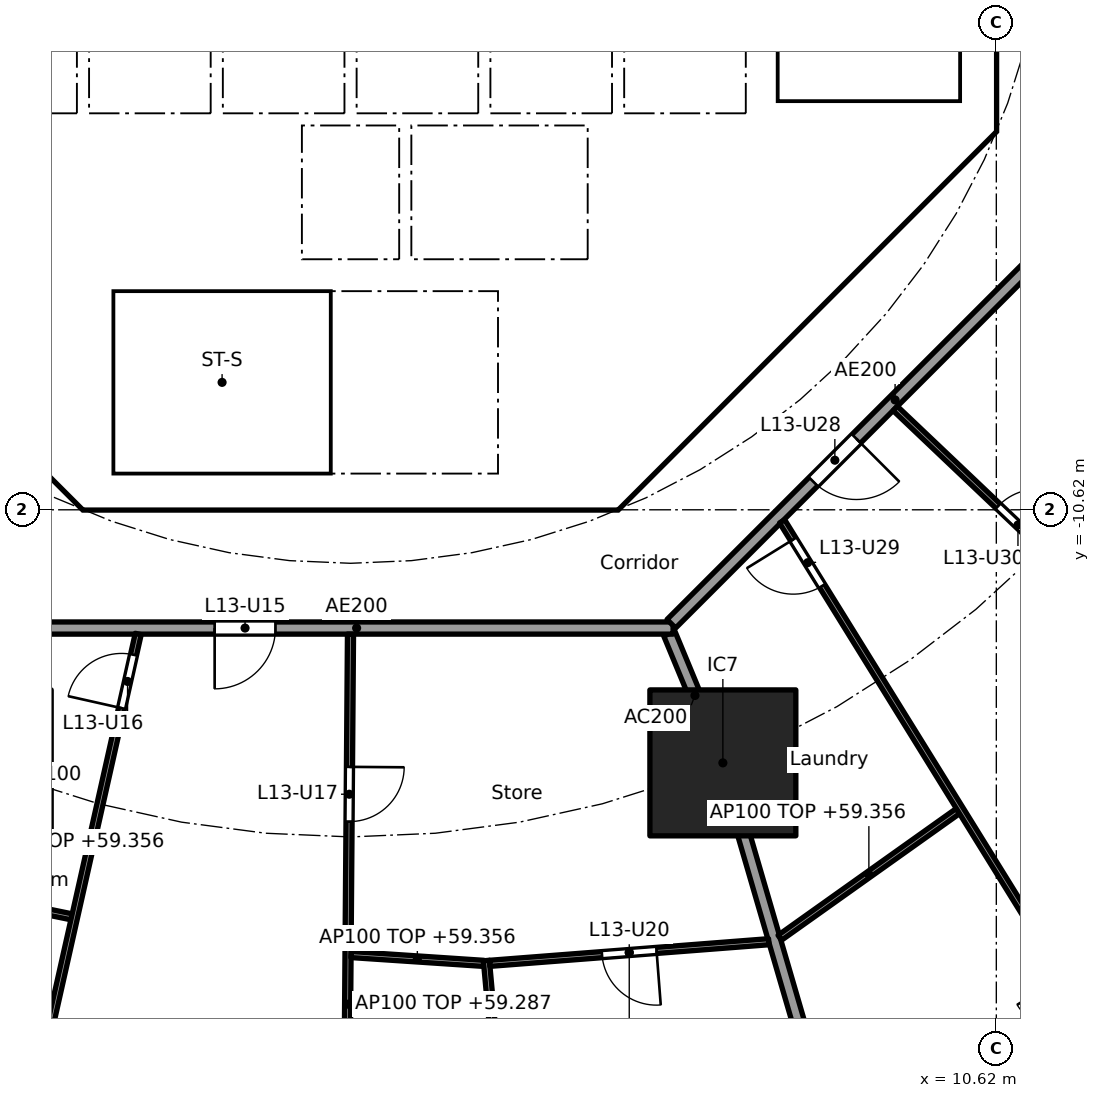
"""IFC4 building model, lengths in metres.
Left out: names, types, materials, properties, quantities, classifications, styles, units other than length and angle.
Written with IfcOpenShell. Run it as: python <this file> out.ifc"""

import sys

from ifc_helpers import new_model, si_unit, direction, frame, frame_2d, origin, origin_2d, place, context, subcontext, project, spatial, polyline, rectangle, outline, extrude, element, fill, save


model = new_model("IFC4")
c1 = context("Model", 3, precision=1e-05, world=origin(), true_north=direction((0.0, 1.0)))
c2 = subcontext(c1, "Body", "Model", "MODEL_VIEW")
j1 = project(units=[si_unit("LENGTHUNIT", "METRE"), si_unit("PLANEANGLEUNIT", "RADIAN")], contexts=[c1])
p1 = place(None, origin())
s1 = spatial("IfcSite", under=j1, at=p1, CompositionType="ELEMENT")
p2 = place(p1, origin())
s2 = spatial("IfcBuilding", under=s1, at=p2, CompositionType="ELEMENT")
p3 = place(p2, frame((0.0, 0.0, 56.6)))
s3 = spatial("IfcBuildingStorey", under=s2, at=p3, CompositionType="ELEMENT", Elevation=56.6)
p4 = place(p3, frame((6.123, -14.782, 0.0), z_axis=(0.0, 0.0, 1.0), x_axis=(1.0, 0.0, 0.0)))
e1 = element("IfcColumn", 1, at=p4, inside=s3, PredefinedType="COLUMN", context=c2, shape_type="SweptSolid", body=[
    extrude(rectangle(XDim=2.4, YDim=2.4, at=origin_2d()), origin(), (0.0, 0.0, 1.0), 3.7),
])
p5 = place(p3, frame((-9.988, -4.613, 0.0), z_axis=(0.0, 0.0, 1.0), x_axis=(0.707106781187, -0.707106781187, 0.0)))
e2 = element("IfcWall", 2, at=p5, inside=s3, PredefinedType="SHEAR", context=c2, shape_type="SweptSolid", body=[
    extrude(rectangle(XDim=7.602, YDim=0.6, at=frame_2d((3.801, 0.0))), origin(), (0.0, 0.0, 1.0), 3.44),
])
p6 = place(p5, frame((6.151, 0.0, 0.0)))
e3 = element("IfcOpeningElement", 3, at=p6, cuts=e2, PredefinedType="OPENING", context=c2, shape_type="SweptSolid", body=[
    extrude(rectangle(XDim=1.1, YDim=2.1, at=frame_2d((0.55, 1.05))), frame((0.0, 0.31, 0.0), z_axis=(0.0, -1.0, 0.0), x_axis=(1.0, 0.0, 0.0)), (0.0, 0.0, 1.0), 0.62),
])
p7 = place(p3, frame((4.613, -9.988, 0.0), z_axis=(0.0, 0.0, 1.0), x_axis=(0.707106781187, 0.707106781187, 0.0)))
e4 = element("IfcWall", 4, at=p7, inside=s3, PredefinedType="SHEAR", context=c2, shape_type="SweptSolid", body=[
    extrude(rectangle(XDim=7.602, YDim=0.6, at=frame_2d((3.801, 0.0))), origin(), (0.0, 0.0, 1.0), 3.44),
])
p8 = place(p7, frame((3.201, 0.0, 0.0)))
e5 = element("IfcOpeningElement", 5, at=p8, cuts=e4, PredefinedType="OPENING", context=c2, shape_type="SweptSolid", body=[
    extrude(rectangle(XDim=1.2, YDim=2.1, at=frame_2d((0.6, 1.05))), frame((0.0, 0.31, 0.0), z_axis=(0.0, -1.0, 0.0), x_axis=(1.0, 0.0, 0.0)), (0.0, 0.0, 1.0), 0.62),
])
p9 = place(p3, frame((4.0, -10.025, 0.0), z_axis=(0.0, 0.0, 1.0), x_axis=(0.0, 1.0, 0.0)))
e6 = element("IfcWall", 6, at=p9, inside=s3, PredefinedType="SOLIDWALL", context=c2, shape_type="SweptSolid", body=[
    extrude(rectangle(XDim=3.0, YDim=0.2, at=frame_2d((1.5, 0.0))), origin(), (0.0, 0.0, 1.0), 3.44),
])
p10 = place(p9, frame((0.975, 0.0, 0.0)))
e7 = element("IfcOpeningElement", 7, at=p10, cuts=e6, PredefinedType="OPENING", context=c2, shape_type="SweptSolid", body=[
    extrude(rectangle(XDim=1.1, YDim=2.1, at=frame_2d((0.55, 1.05))), frame((0.0, 0.11, 0.0), z_axis=(0.0, -1.0, 0.0), x_axis=(1.0, 0.0, 0.0)), (0.0, 0.0, 1.0), 0.22),
])
p11 = place(p3, frame((4.0, -6.5, 0.0), z_axis=(0.0, 0.0, 1.0), x_axis=(0.0, 1.0, 0.0)))
e8 = element("IfcWall", 8, at=p11, inside=s3, PredefinedType="SOLIDWALL", context=c2, shape_type="SweptSolid", body=[
    extrude(rectangle(XDim=2.2, YDim=0.2, at=frame_2d((1.1, 0.0))), origin(), (0.0, 0.0, 1.0), 3.44),
])
p12 = place(p11, frame((0.55, 0.0, 0.0)))
e9 = element("IfcOpeningElement", 9, at=p12, cuts=e8, PredefinedType="OPENING", context=c2, shape_type="SweptSolid", body=[
    extrude(rectangle(XDim=1.1, YDim=2.1, at=frame_2d((0.55, 1.05))), frame((0.0, 0.11, 0.0), z_axis=(0.0, -1.0, 0.0), x_axis=(1.0, 0.0, 0.0)), (0.0, 0.0, 1.0), 0.22),
])
p13 = place(p3, frame((-4.0, -6.5, 0.0), z_axis=(0.0, 0.0, 1.0), x_axis=(0.0, 1.0, 0.0)))
e10 = element("IfcWall", 10, at=p13, inside=s3, PredefinedType="SOLIDWALL", context=c2, shape_type="SweptSolid", body=[
    extrude(rectangle(XDim=2.2, YDim=0.2, at=frame_2d((1.1, 0.0))), origin(), (0.0, 0.0, 1.0), 3.44),
])
p14 = place(p13, frame((0.65, 0.0, 0.0)))
e11 = element("IfcOpeningElement", 11, at=p14, cuts=e10, PredefinedType="OPENING", context=c2, shape_type="SweptSolid", body=[
    extrude(rectangle(XDim=0.9, YDim=2.1, at=frame_2d((0.45, 1.05))), frame((0.0, 0.11, 0.0), z_axis=(0.0, -1.0, 0.0), x_axis=(1.0, 0.0, 0.0)), (0.0, 0.0, 1.0), 0.22),
])
p15 = place(p3, origin())
e12 = element("IfcWall", 12, at=p15, inside=s3, PredefinedType="SHEAR", context=c2, shape_type="SweptSolid", body=[
    extrude(outline(polyline([(-4.152, -10.025), (4.152, -10.025), (4.401, -9.776), (4.825, -10.2), (4.401, -10.625), (-4.401, -10.625), (-4.825, -10.2), (-4.401, -9.776), (-4.152, -10.025)])), origin(), (0.0, 0.0, 1.0), 3.44),
])
p16 = place(p3, origin())
e13 = element("IfcWall", 13, at=p16, inside=s3, PredefinedType="SHEAR", context=c2, shape_type="SweptSolid", body=[
    extrude(outline(polyline([(9.776, -4.401), (10.025, -4.152), (10.025, -3.801), (10.025, 4.152), (9.776, 4.401), (10.2, 4.825), (10.625, 4.401), (10.625, -4.401), (10.2, -4.825), (9.776, -4.401)])), origin(), (0.0, 0.0, 1.0), 3.44),
])
for number, where, z_axis, x_axis in (
    (14, (-0.9, -6.5, 0.0), (0.0, 0.0, 1.0), (0.0, 1.0, 0.0)),
    (15, (0.9, -6.5, 0.0), (0.0, 0.0, 1.0), (0.0, 1.0, 0.0)),
):
    element("IfcWall", number, at=place(p3, frame(where, z_axis=z_axis, x_axis=x_axis)), inside=s3, PredefinedType="SOLIDWALL", context=c2, shape_type="SweptSolid", body=[
        extrude(rectangle(XDim=2.2, YDim=0.2, at=frame_2d((1.1, 0.0))), origin(), (0.0, 0.0, 1.0), 3.44),
    ])
p17 = place(p3, origin())
e16 = element("IfcWall", 16, at=p17, inside=s3, PredefinedType="SOLIDWALL", context=c2, shape_type="SweptSolid", body=[
    extrude(outline(polyline([(-6.7, -2.1), (-6.5, -2.1), (-6.5, -4.1), (-4.5, -4.1), (-4.5, -2.1), (-4.3, -2.1), (-4.3, -4.1), (-2.3, -4.1), (-2.3, -2.1), (-2.1, -2.1), (-2.1, -4.1), (-0.1, -4.1), (-0.1, -2.1), (0.1, -2.1), (0.1, -4.1), (2.1, -4.1), (2.1, -2.1), (2.3, -2.1), (2.3, -4.1), (4.3, -4.1), (4.3, -2.1), (4.5, -2.1), (4.5, -4.1), (6.5, -4.1), (6.5, -2.1), (6.7, -2.1), (6.7, -4.3), (-6.7, -4.3), (-6.7, -2.1)])), origin(), (0.0, 0.0, 1.0), 3.44),
])
p18 = place(p3, origin())
e17 = element("IfcWall", 17, at=p18, inside=s3, PredefinedType="SOLIDWALL", context=c2, shape_type="SweptSolid", body=[
    extrude(outline(polyline([(-3.9, -10.025), (-4.1, -10.025), (-4.1, -7.025), (-3.9, -7.025), (-3.9, -10.025)])), origin(), (0.0, 0.0, 1.0), 3.44),
])
p19 = place(p3, origin())
e18 = element("IfcWall", 18, at=p19, inside=s3, PredefinedType="SOLIDWALL", context=c2, shape_type="SweptSolid", body=[
    extrude(outline(polyline([(4.1, -7.025), (-4.1, -7.025), (-4.1, -6.5), (4.1, -6.5), (4.1, -7.025)])), origin(), (0.0, 0.0, 1.0), 3.44),
])
p20 = place(p3, origin())
e19 = element("IfcWall", 19, at=p20, inside=s3, PredefinedType="SOLIDWALL", context=c2, shape_type="SweptSolid", body=[
    extrude(outline(polyline([(7.025, -3.9), (6.7, -3.9), (6.7, 3.9), (7.025, 3.9), (7.025, -3.9)])), origin(), (0.0, 0.0, 1.0), 3.44),
])
p21 = place(p3, origin())
e20 = element("IfcWall", 20, at=p21, inside=s3, PredefinedType="SOLIDWALL", context=c2, shape_type="SweptSolid", body=[
    extrude(outline(polyline([(10.025, -4.1), (6.7, -4.1), (6.7, -3.9), (10.025, -3.9), (10.025, -4.1)])), origin(), (0.0, 0.0, 1.0), 3.44),
])
p22 = place(p3, frame((5.243, -12.657, 0.0), z_axis=(0.0, 0.0, 1.0), x_axis=(0.382707856524, -0.923869415315, 0.0)))
e21 = element("IfcWall", 21, at=p22, inside=s3, PredefinedType="PARTITIONING", context=c2, shape_type="SweptSolid", body=[
    extrude(rectangle(XDim=2.2, YDim=0.2, at=frame_2d((1.1, 0.0))), origin(), (0.0, 0.0, 1.0), 3.44),
])
p23 = place(p3, frame((6.137, -14.83, 0.0), z_axis=(0.0, 0.0, 1.0), x_axis=(0.27985745069, -0.960041565399, 0.0)))
e22 = element("IfcWall", 22, at=p23, inside=s3, PredefinedType="PARTITIONING", context=c2, shape_type="SweptSolid", body=[
    extrude(rectangle(XDim=16.705, YDim=0.2, at=frame_2d((8.353, 0.0))), origin(), (0.0, 0.0, 1.0), 2.756),
])
p24 = place(p3, frame((-5.104, -12.565, 0.0), z_axis=(0.0, 0.0, 1.0), x_axis=(1.0, 0.0, 0.0)))
e23 = element("IfcWall", 23, at=p24, inside=s3, PredefinedType="PARTITIONING", context=c2, shape_type="SweptSolid", body=[
    extrude(rectangle(XDim=10.409, YDim=0.2, at=frame_2d((5.205, 0.0))), origin(), (0.0, 0.0, 1.0), 3.44),
])
p25 = place(p24, frame((2.87, 0.0, 0.0)))
e24 = element("IfcOpeningElement", 24, at=p25, cuts=e23, PredefinedType="OPENING", context=c2, shape_type="SweptSolid", body=[
    extrude(rectangle(XDim=1.0, YDim=2.1, at=frame_2d((0.5, 1.05))), frame((0.0, 0.11, 0.0), z_axis=(0.0, -1.0, 0.0), x_axis=(1.0, 0.0, 0.0)), (0.0, 0.0, 1.0), 0.22),
])
p26 = place(p3, frame((5.275, -12.494, 0.0), z_axis=(0.0, 0.0, 1.0), x_axis=(0.707106781187, 0.707106781187, 0.0)))
e25 = element("IfcWall", 25, at=p26, inside=s3, PredefinedType="PARTITIONING", context=c2, shape_type="SweptSolid", body=[
    extrude(rectangle(XDim=10.409, YDim=0.2, at=frame_2d((5.205, 0.0))), origin(), (0.0, 0.0, 1.0), 3.44),
])
p27 = place(p26, frame((3.303, 0.0, 0.0)))
e26 = element("IfcOpeningElement", 26, at=p27, cuts=e25, PredefinedType="OPENING", context=c2, shape_type="SweptSolid", body=[
    extrude(rectangle(XDim=1.0, YDim=2.1, at=frame_2d((0.5, 1.05))), frame((0.0, 0.11, 0.0), z_axis=(0.0, -1.0, 0.0), x_axis=(1.0, 0.0, 0.0)), (0.0, 0.0, 1.0), 0.22),
])
p28 = place(p3, frame((-6.791, -16.862, 0.0), z_axis=(0.0, 0.0, 1.0), x_axis=(0.979581941859, -0.201045316246, 0.0)))
e27 = element("IfcWall", 27, at=p28, inside=s3, PredefinedType="PARTITIONING", context=c2, shape_type="SweptSolid", body=[
    extrude(rectangle(XDim=2.256, YDim=0.1, at=frame_2d((1.128, 0.0))), origin(), (0.0, 0.0, 1.0), 2.756),
])
p29 = place(p3, frame((-3.492, -12.662, 0.0), z_axis=(0.0, 0.0, 1.0), x_axis=(-0.219268088006, -0.975664648115, 0.0)))
e28 = element("IfcWall", 28, at=p29, inside=s3, PredefinedType="PARTITIONING", context=c2, shape_type="SweptSolid", body=[
    extrude(rectangle(XDim=18.23, YDim=0.1, at=frame_2d((9.115, 0.0))), origin(), (0.0, 0.0, 1.0), 2.687),
])
p30 = place(p29, frame((0.35, 0.0, 0.0)))
e29 = element("IfcOpeningElement", 29, at=p30, cuts=e28, PredefinedType="OPENING", context=c2, shape_type="SweptSolid", body=[
    extrude(rectangle(XDim=0.9, YDim=2.1, at=frame_2d((0.45, 1.05))), frame((0.0, 0.06, 0.0), z_axis=(0.0, -1.0, 0.0), x_axis=(1.0, 0.0, 0.0)), (0.0, 0.0, 1.0), 0.12),
])
p31 = place(p29, frame((7.497, 0.0, 0.0)))
e30 = element("IfcOpeningElement", 30, at=p31, cuts=e28, PredefinedType="OPENING", context=c2, shape_type="SweptSolid", body=[
    extrude(rectangle(XDim=0.9, YDim=2.1, at=frame_2d((0.45, 1.05))), frame((0.0, 0.06, 0.0), z_axis=(0.0, -1.0, 0.0), x_axis=(1.0, 0.0, 0.0)), (0.0, 0.0, 1.0), 0.12),
])
p32 = place(p29, frame((14.223, 0.0, 0.0)))
e31 = element("IfcOpeningElement", 31, at=p32, cuts=e28, PredefinedType="OPENING", context=c2, shape_type="SweptSolid", body=[
    extrude(rectangle(XDim=0.9, YDim=2.1, at=frame_2d((0.45, 1.05))), frame((0.0, 0.06, 0.0), z_axis=(0.0, -1.0, 0.0), x_axis=(1.0, 0.0, 0.0)), (0.0, 0.0, 1.0), 0.12),
])
p33 = place(p3, frame((-0.001, -12.665, 0.0), z_axis=(0.0, 0.0, 1.0), x_axis=(-0.007702417287, -0.999970335944, 0.0)))
e32 = element("IfcWall", 32, at=p33, inside=s3, PredefinedType="PARTITIONING", context=c2, shape_type="SweptSolid", body=[
    extrude(rectangle(XDim=12.171, YDim=0.1, at=frame_2d((6.086, 0.0))), origin(), (0.0, 0.0, 1.0), 2.687),
])
p34 = place(p33, frame((2.183, 0.0, 0.0)))
e33 = element("IfcOpeningElement", 33, at=p34, cuts=e32, PredefinedType="OPENING", context=c2, shape_type="SweptSolid", body=[
    extrude(rectangle(XDim=0.9, YDim=2.1, at=frame_2d((0.45, 1.05))), frame((0.0, 0.06, 0.0), z_axis=(0.0, -1.0, 0.0), x_axis=(1.0, 0.0, 0.0)), (0.0, 0.0, 1.0), 0.12),
])
p35 = place(p33, frame((8.269, 0.0, 0.0)))
e34 = element("IfcOpeningElement", 34, at=p35, cuts=e32, PredefinedType="OPENING", context=c2, shape_type="SweptSolid", body=[
    extrude(rectangle(XDim=0.9, YDim=2.1, at=frame_2d((0.45, 1.05))), frame((0.0, 0.06, 0.0), z_axis=(0.0, -1.0, 0.0), x_axis=(1.0, 0.0, 0.0)), (0.0, 0.0, 1.0), 0.12),
])
p36 = place(p3, frame((0.009, -17.934, 0.0), z_axis=(0.0, 0.0, 1.0), x_axis=(0.997794542617, -0.066378089183, 0.0)))
e35 = element("IfcWall", 35, at=p36, inside=s3, PredefinedType="PARTITIONING", context=c2, shape_type="SweptSolid", body=[
    extrude(rectangle(XDim=2.185, YDim=0.1, at=frame_2d((1.092, 0.0))), origin(), (0.0, 0.0, 1.0), 2.756),
])
p37 = place(p3, frame((2.234, -18.032, 0.0), z_axis=(0.0, 0.0, 1.0), x_axis=(0.090891502968, -0.995860800859, 0.0)))
e36 = element("IfcWall", 36, at=p37, inside=s3, PredefinedType="PARTITIONING", context=c2, shape_type="SweptSolid", body=[
    extrude(rectangle(XDim=13.984, YDim=0.1, at=frame_2d((6.992, 0.0))), origin(), (0.0, 0.0, 1.0), 2.756),
])
p38 = place(p37, frame((10.158, 0.0, 0.0)))
e37 = element("IfcOpeningElement", 37, at=p38, cuts=e36, PredefinedType="OPENING", context=c2, shape_type="SweptSolid", body=[
    extrude(rectangle(XDim=0.9, YDim=2.1, at=frame_2d((0.45, 1.05))), frame((0.0, 0.06, 0.0), z_axis=(0.0, -1.0, 0.0), x_axis=(1.0, 0.0, 0.0)), (0.0, 0.0, 1.0), 0.12),
])
p39 = place(p3, frame((2.288, -18.078, 0.0), z_axis=(0.0, 0.0, 1.0), x_axis=(0.99701850123, 0.077162868047, 0.0)))
e38 = element("IfcWall", 38, at=p39, inside=s3, PredefinedType="PARTITIONING", context=c2, shape_type="SweptSolid", body=[
    extrude(rectangle(XDim=4.604, YDim=0.1, at=frame_2d((2.302, 0.0))), origin(), (0.0, 0.0, 1.0), 2.756),
])
p40 = place(p39, frame((1.852, 0.0, 0.0)))
e39 = element("IfcOpeningElement", 39, at=p40, cuts=e38, PredefinedType="OPENING", context=c2, shape_type="SweptSolid", body=[
    extrude(rectangle(XDim=0.9, YDim=2.1, at=frame_2d((0.45, 1.05))), frame((0.0, 0.06, 0.0), z_axis=(0.0, -1.0, 0.0), x_axis=(1.0, 0.0, 0.0)), (0.0, 0.0, 1.0), 0.12),
])
p41 = place(p3, frame((7.06, -17.657, 0.0), z_axis=(0.0, 0.0, 1.0), x_axis=(0.81492039338, 0.57957290521, 0.0)))
e40 = element("IfcWall", 40, at=p41, inside=s3, PredefinedType="PARTITIONING", context=c2, shape_type="SweptSolid", body=[
    extrude(rectangle(XDim=3.594, YDim=0.1, at=frame_2d((1.797, 0.0))), origin(), (0.0, 0.0, 1.0), 2.756),
])
p42 = place(p3, frame((7.097, -10.81, 0.0), z_axis=(0.0, 0.0, 1.0), x_axis=(0.526453266471, -0.850204068576, 0.0)))
e41 = element("IfcWall", 41, at=p42, inside=s3, PredefinedType="PARTITIONING", context=c2, shape_type="SweptSolid", body=[
    extrude(rectangle(XDim=19.85, YDim=0.1, at=frame_2d((9.925, 0.0))), origin(), (0.0, 0.0, 1.0), 2.687),
])
p43 = place(p42, frame((0.35, 0.0, 0.0)))
e42 = element("IfcOpeningElement", 42, at=p43, cuts=e41, PredefinedType="OPENING", context=c2, shape_type="SweptSolid", body=[
    extrude(rectangle(XDim=0.9, YDim=2.1, at=frame_2d((0.45, 1.05))), frame((0.0, 0.06, 0.0), z_axis=(0.0, -1.0, 0.0), x_axis=(1.0, 0.0, 0.0)), (0.0, 0.0, 1.0), 0.12),
])
p44 = place(p42, frame((8.795, 0.0, 0.0)))
e43 = element("IfcOpeningElement", 43, at=p44, cuts=e41, PredefinedType="OPENING", context=c2, shape_type="SweptSolid", body=[
    extrude(rectangle(XDim=0.9, YDim=2.1, at=frame_2d((0.45, 1.05))), frame((0.0, 0.06, 0.0), z_axis=(0.0, -1.0, 0.0), x_axis=(1.0, 0.0, 0.0)), (0.0, 0.0, 1.0), 0.12),
])
p45 = place(p3, frame((8.957, -8.953, 0.0), z_axis=(0.0, 0.0, 1.0), x_axis=(0.725250022034, -0.688485588476, 0.0)))
e44 = element("IfcWall", 44, at=p45, inside=s3, PredefinedType="PARTITIONING", context=c2, shape_type="SweptSolid", body=[
    extrude(rectangle(XDim=12.963, YDim=0.1, at=frame_2d((6.481, 0.0))), origin(), (0.0, 0.0, 1.0), 2.687),
])
p46 = place(p45, frame((2.333, 0.0, 0.0)))
e45 = element("IfcOpeningElement", 45, at=p46, cuts=e44, PredefinedType="OPENING", context=c2, shape_type="SweptSolid", body=[
    extrude(rectangle(XDim=0.9, YDim=2.1, at=frame_2d((0.45, 1.05))), frame((0.0, 0.06, 0.0), z_axis=(0.0, -1.0, 0.0), x_axis=(1.0, 0.0, 0.0)), (0.0, 0.0, 1.0), 0.12),
])
p47 = place(p45, frame((8.79, 0.0, 0.0)))
e46 = element("IfcOpeningElement", 46, at=p47, cuts=e44, PredefinedType="OPENING", context=c2, shape_type="SweptSolid", body=[
    extrude(rectangle(XDim=0.9, YDim=2.1, at=frame_2d((0.45, 1.05))), frame((0.0, 0.06, 0.0), z_axis=(0.0, -1.0, 0.0), x_axis=(1.0, 0.0, 0.0)), (0.0, 0.0, 1.0), 0.12),
])
p48 = place(p12, origin())
e47 = element("IfcDoor", 47, at=p48, inside=s3, OperationType="DOUBLE_DOOR_SLIDING", PredefinedType="DOOR", context=c2, shape_type="SweptSolid", body=[
    extrude(rectangle(XDim=1.1, YDim=2.1, at=frame_2d((0.55, 1.05))), frame((0.0, 0.025, 0.0), z_axis=(0.0, -1.0, 0.0), x_axis=(1.0, 0.0, 0.0)), (0.0, 0.0, 1.0), 0.05),
])
fill(e9, e47)
p49 = place(p10, origin())
e48 = element("IfcDoor", 48, at=p49, inside=s3, OperationType="SINGLE_SWING_RIGHT", PredefinedType="DOOR", context=c2, shape_type="SweptSolid", body=[
    extrude(rectangle(XDim=1.1, YDim=2.1, at=frame_2d((0.55, 1.05))), frame((0.0, 0.025, 0.0), z_axis=(0.0, -1.0, 0.0), x_axis=(1.0, 0.0, 0.0)), (0.0, 0.0, 1.0), 0.05),
])
fill(e7, e48)
p50 = place(p14, frame((0.9, 0.0, 0.0), x_axis=(-1.0, 0.0, 0.0)))
e49 = element("IfcDoor", 49, at=p50, inside=s3, OperationType="SINGLE_SWING_RIGHT", PredefinedType="DOOR", context=c2, shape_type="SweptSolid", body=[
    extrude(rectangle(XDim=0.9, YDim=2.1, at=frame_2d((0.45, 1.05))), frame((0.0, 0.025, 0.0), z_axis=(0.0, -1.0, 0.0), x_axis=(1.0, 0.0, 0.0)), (0.0, 0.0, 1.0), 0.05),
])
fill(e11, e49)
p51 = place(p8, origin())
e50 = element("IfcDoor", 50, at=p51, inside=s3, OperationType="SINGLE_SWING_LEFT", PredefinedType="DOOR", context=c2, shape_type="SweptSolid", body=[
    extrude(rectangle(XDim=1.2, YDim=2.1, at=frame_2d((0.6, 1.05))), frame((0.0, 0.025, 0.0), z_axis=(0.0, -1.0, 0.0), x_axis=(1.0, 0.0, 0.0)), (0.0, 0.0, 1.0), 0.05),
])
fill(e5, e50)
p52 = place(p6, origin())
e51 = element("IfcDoor", 51, at=p52, inside=s3, OperationType="SINGLE_SWING_LEFT", PredefinedType="DOOR", context=c2, shape_type="SweptSolid", body=[
    extrude(rectangle(XDim=1.1, YDim=2.1, at=frame_2d((0.55, 1.05))), frame((0.0, 0.025, 0.0), z_axis=(0.0, -1.0, 0.0), x_axis=(1.0, 0.0, 0.0)), (0.0, 0.0, 1.0), 0.05),
])
fill(e3, e51)
p53 = place(p25, frame((1.0, 0.0, 0.0), x_axis=(-1.0, 0.0, 0.0)))
e52 = element("IfcDoor", 52, at=p53, inside=s3, OperationType="SINGLE_SWING_RIGHT", PredefinedType="DOOR", context=c2, shape_type="SweptSolid", body=[
    extrude(rectangle(XDim=1.0, YDim=2.1, at=frame_2d((0.5, 1.05))), frame((0.0, 0.025, 0.0), z_axis=(0.0, -1.0, 0.0), x_axis=(1.0, 0.0, 0.0)), (0.0, 0.0, 1.0), 0.05),
])
fill(e24, e52)
p54 = place(p30, frame((0.9, 0.0, 0.0), x_axis=(-1.0, 0.0, 0.0)))
e53 = element("IfcDoor", 53, at=p54, inside=s3, OperationType="SINGLE_SWING_LEFT", PredefinedType="DOOR", context=c2, shape_type="SweptSolid", body=[
    extrude(rectangle(XDim=0.9, YDim=2.1, at=frame_2d((0.45, 1.05))), frame((0.0, 0.025, 0.0), z_axis=(0.0, -1.0, 0.0), x_axis=(1.0, 0.0, 0.0)), (0.0, 0.0, 1.0), 0.05),
])
fill(e29, e53)
p55 = place(p34, origin())
e54 = element("IfcDoor", 54, at=p55, inside=s3, OperationType="SINGLE_SWING_LEFT", PredefinedType="DOOR", context=c2, shape_type="SweptSolid", body=[
    extrude(rectangle(XDim=0.9, YDim=2.1, at=frame_2d((0.45, 1.05))), frame((0.0, 0.025, 0.0), z_axis=(0.0, -1.0, 0.0), x_axis=(1.0, 0.0, 0.0)), (0.0, 0.0, 1.0), 0.05),
])
fill(e33, e54)
p56 = place(p40, frame((0.9, 0.0, 0.0), x_axis=(-1.0, 0.0, 0.0)))
e55 = element("IfcDoor", 55, at=p56, inside=s3, OperationType="SINGLE_SWING_LEFT", PredefinedType="DOOR", context=c2, shape_type="SweptSolid", body=[
    extrude(rectangle(XDim=0.9, YDim=2.1, at=frame_2d((0.45, 1.05))), frame((0.0, 0.025, 0.0), z_axis=(0.0, -1.0, 0.0), x_axis=(1.0, 0.0, 0.0)), (0.0, 0.0, 1.0), 0.05),
])
fill(e39, e55)
p57 = place(p27, frame((1.0, 0.0, 0.0), x_axis=(-1.0, 0.0, 0.0)))
e56 = element("IfcDoor", 56, at=p57, inside=s3, OperationType="SINGLE_SWING_LEFT", PredefinedType="DOOR", context=c2, shape_type="SweptSolid", body=[
    extrude(rectangle(XDim=1.0, YDim=2.1, at=frame_2d((0.5, 1.05))), frame((0.0, 0.025, 0.0), z_axis=(0.0, -1.0, 0.0), x_axis=(1.0, 0.0, 0.0)), (0.0, 0.0, 1.0), 0.05),
])
fill(e26, e56)
p58 = place(p43, frame((0.9, 0.0, 0.0), x_axis=(-1.0, 0.0, 0.0)))
e57 = element("IfcDoor", 57, at=p58, inside=s3, OperationType="SINGLE_SWING_RIGHT", PredefinedType="DOOR", context=c2, shape_type="SweptSolid", body=[
    extrude(rectangle(XDim=0.9, YDim=2.1, at=frame_2d((0.45, 1.05))), frame((0.0, 0.025, 0.0), z_axis=(0.0, -1.0, 0.0), x_axis=(1.0, 0.0, 0.0)), (0.0, 0.0, 1.0), 0.05),
])
fill(e42, e57)
p59 = place(p46, origin())
e58 = element("IfcDoor", 58, at=p59, inside=s3, OperationType="SINGLE_SWING_RIGHT", PredefinedType="DOOR", context=c2, shape_type="SweptSolid", body=[
    extrude(rectangle(XDim=0.9, YDim=2.1, at=frame_2d((0.45, 1.05))), frame((0.0, 0.025, 0.0), z_axis=(0.0, -1.0, 0.0), x_axis=(1.0, 0.0, 0.0)), (0.0, 0.0, 1.0), 0.05),
])
fill(e45, e58)
save(model, sys.argv[1])
